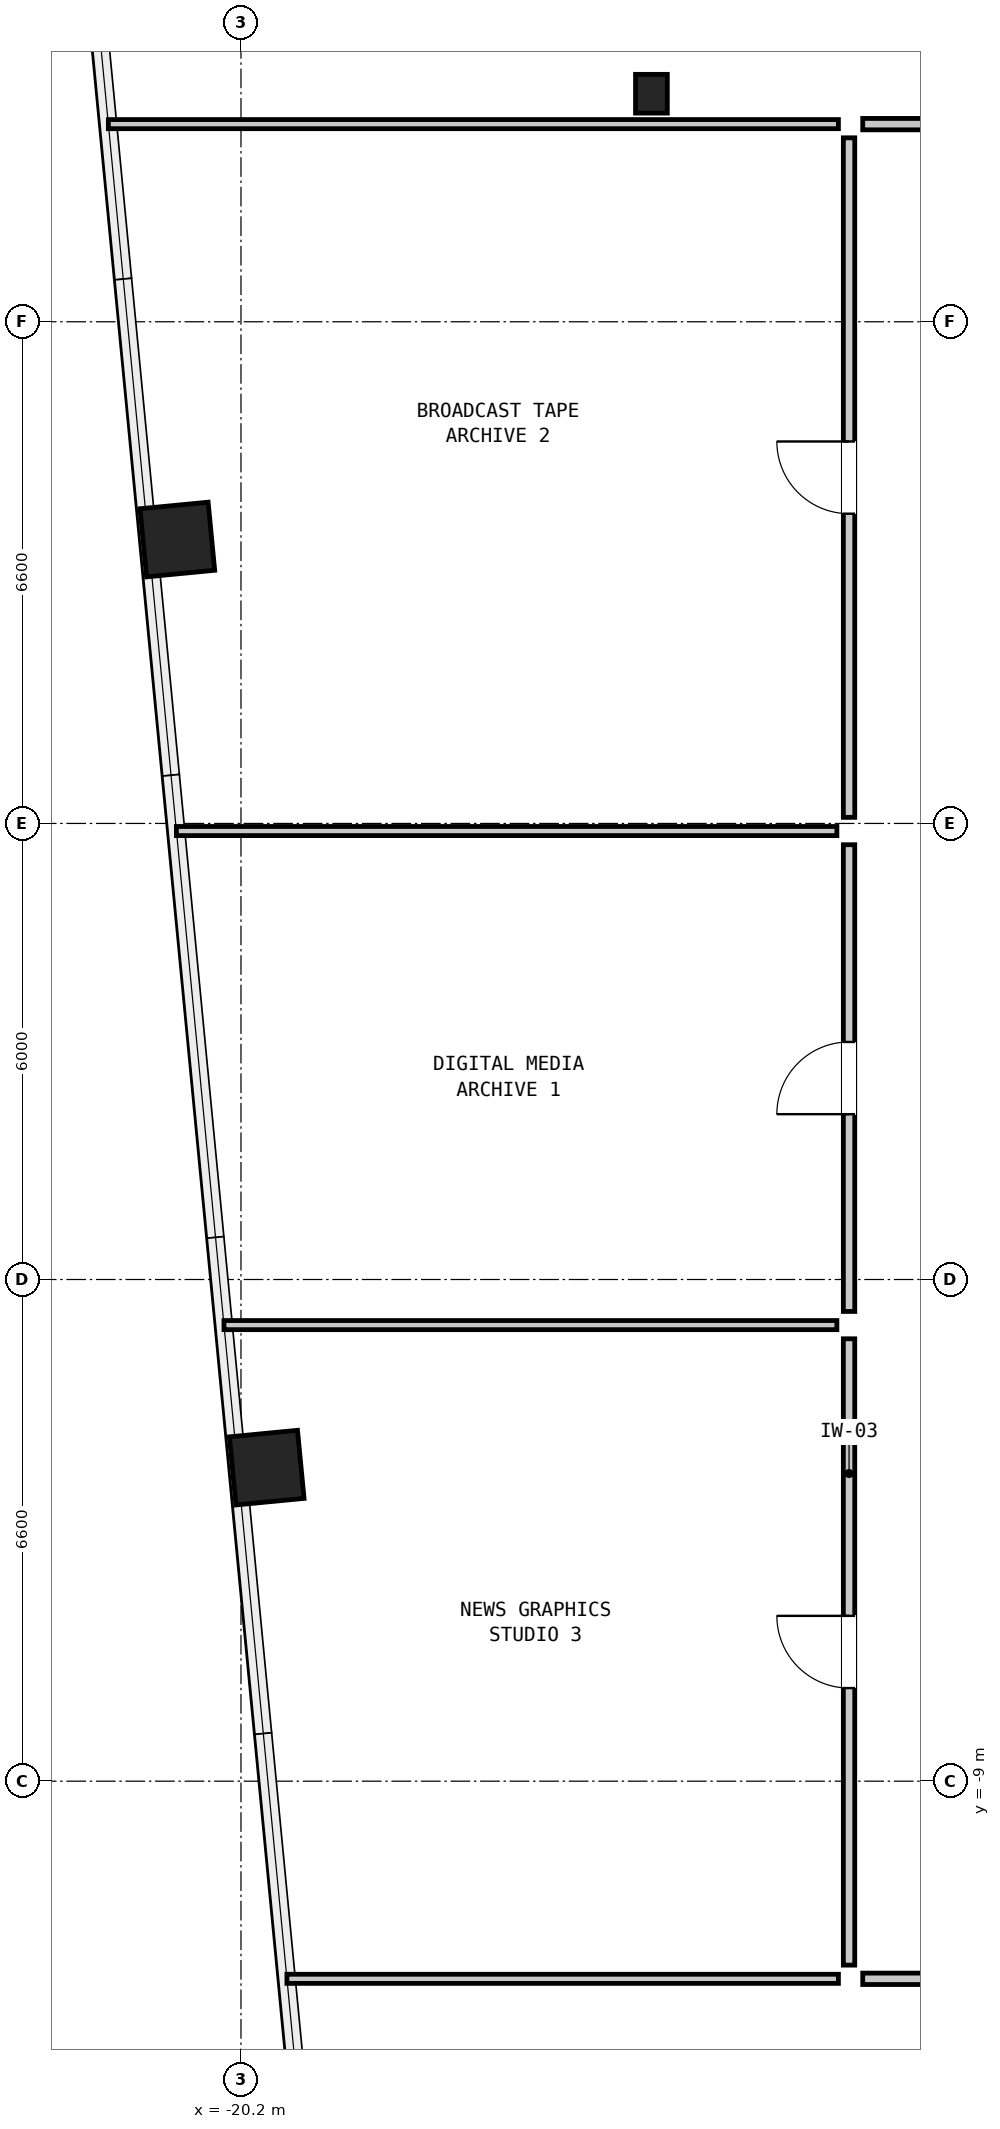
"""IFC4 building model, lengths in metres.
Left out: names, types, materials, properties, quantities, classifications, styles, units other than length and angle.
Written with IfcOpenShell. Run it as: python <this file> out.ifc"""

import sys

from ifc_helpers import new_model, si_unit, direction, frame, frame_2d, origin, origin_2d, place, context, subcontext, project, spatial, rectangle, hollow_rectangle, i_section, extrude, element, fill, save


model = new_model("IFC4")
c1 = context("Model", 3, precision=1e-05, world=origin(), true_north=direction((0.0, 1.0)))
c2 = subcontext(c1, "Body", "Model", "MODEL_VIEW")
j1 = project(units=[si_unit("LENGTHUNIT", "METRE"), si_unit("PLANEANGLEUNIT", "RADIAN")], contexts=[c1])
p1 = place(None, origin())
s1 = spatial("IfcSite", under=j1, at=p1, CompositionType="ELEMENT")
p2 = place(p1, origin())
s2 = spatial("IfcBuilding", under=s1, at=p2, CompositionType="ELEMENT")
p3 = place(p2, frame((0.0, 0.0, 90.8)))
s3 = spatial("IfcBuildingStorey", under=s2, at=p3, CompositionType="ELEMENT", Elevation=90.8)
for number, where, z_axis, x_axis in (
    (1, (-21.037, 7.335, 0.0), (0.0, 0.0, 1.0), (-0.096, 0.995, 0.0)),
    (2, (-19.861, -4.875, 0.0), (0.0, 0.0, 1.0), (-0.096, 0.995, 0.0)),
):
    element("IfcColumn", number, at=place(p3, frame(where, z_axis=z_axis, x_axis=x_axis)), inside=s3, PredefinedType="COLUMN", context=c2, shape_type="SweptSolid", body=[
        extrude(hollow_rectangle(XDim=0.9, YDim=0.9, WallThickness=0.055, at=origin_2d()), origin(), (0.0, 0.0, 1.0), 3.05),
    ])
p4 = place(p3, frame((-14.8, 13.2, 0.0), z_axis=(0.0, 0.0, 1.0), x_axis=(1.0, 0.0, 0.0)))
e3 = element("IfcColumn", 3, at=p4, inside=s3, PredefinedType="COLUMN", context=c2, shape_type="SweptSolid", body=[
    extrude(i_section(OverallWidth=0.418, OverallDepth=0.51, WebThickness=0.042, FlangeThickness=0.068, at=origin_2d()), origin(), (0.0, 0.0, 1.0), 3.05),
])
p5 = place(p3, frame((-21.945, 12.8, 0.0), z_axis=(0.0, 0.0, 1.0), x_axis=(1.0, 0.0, 0.0)))
e4 = element("IfcWall", 4, at=p5, inside=s3, PredefinedType="PARTITIONING", context=c2, shape_type="SweptSolid", body=[
    extrude(rectangle(XDim=9.605, YDim=0.12, at=frame_2d((4.802, 0.0))), origin(), (0.0, 0.0, 1.0), 2.83),
])
p6 = place(p3, frame((-19.595, -11.6, 0.0), z_axis=(0.0, 0.0, 1.0), x_axis=(1.0, 0.0, 0.0)))
e5 = element("IfcWall", 5, at=p6, inside=s3, PredefinedType="PARTITIONING", context=c2, shape_type="SweptSolid", body=[
    extrude(rectangle(XDim=7.255, YDim=0.12, at=frame_2d((3.628, 0.0))), origin(), (0.0, 0.0, 1.0), 2.274),
])
p7 = place(p3, frame((-20.424, -3.0, 0.0), z_axis=(0.0, 0.0, 1.0), x_axis=(1.0, 0.0, 0.0)))
e6 = element("IfcWall", 6, at=p7, inside=s3, PredefinedType="PARTITIONING", context=c2, shape_type="SweptSolid", body=[
    extrude(rectangle(XDim=8.063, YDim=0.12, at=frame_2d((4.032, 0.0))), origin(), (0.0, 0.0, 1.0), 1.799),
])
p8 = place(p3, frame((-21.049, 3.5, 0.0), z_axis=(0.0, 0.0, 1.0), x_axis=(1.0, 0.0, 0.0)))
e7 = element("IfcWall", 7, at=p8, inside=s3, PredefinedType="PARTITIONING", context=c2, shape_type="SweptSolid", body=[
    extrude(rectangle(XDim=8.689, YDim=0.12, at=frame_2d((4.345, 0.0))), origin(), (0.0, 0.0, 1.0), 1.799),
])
p9 = place(p3, frame((-12.02, 12.8, 0.0), z_axis=(0.0, 0.0, 1.0), x_axis=(1.0, 0.0, 0.0)))
e8 = element("IfcWall", 8, at=p9, inside=s3, PredefinedType="PARTITIONING", context=c2, shape_type="SweptSolid", body=[
    extrude(rectangle(XDim=5.34, YDim=0.15, at=frame_2d((2.67, 0.0))), origin(), (0.0, 0.0, 1.0), 2.83),
])
p10 = place(p9, frame((2.995, 0.0, 0.0)))
e9 = element("IfcOpeningElement", 9, at=p10, cuts=e8, PredefinedType="OPENING", context=c2, shape_type="SweptSolid", body=[
    extrude(rectangle(XDim=0.95, YDim=2.1, at=frame_2d((0.475, 1.05))), frame((0.0, 0.087, 0.0), z_axis=(0.0, -1.0, 0.0), x_axis=(1.0, 0.0, 0.0)), (0.0, 0.0, 1.0), 0.174),
])
p11 = place(p3, frame((-12.02, -11.6, 0.0), z_axis=(0.0, 0.0, 1.0), x_axis=(1.0, 0.0, 0.0)))
e10 = element("IfcWall", 10, at=p11, inside=s3, PredefinedType="PARTITIONING", context=c2, shape_type="SweptSolid", body=[
    extrude(rectangle(XDim=5.84, YDim=0.15, at=frame_2d((2.92, 0.0))), origin(), (0.0, 0.0, 1.0), 2.274),
])
p12 = place(p11, frame((3.045, 0.0, 0.0)))
e11 = element("IfcOpeningElement", 11, at=p12, cuts=e10, PredefinedType="OPENING", context=c2, shape_type="SweptSolid", body=[
    extrude(rectangle(XDim=0.95, YDim=2.1, at=frame_2d((0.475, 1.05))), frame((0.0, 0.087, 0.0), z_axis=(0.0, -1.0, 0.0), x_axis=(1.0, 0.0, 0.0)), (0.0, 0.0, 1.0), 0.174),
])
p13 = place(p3, frame((-12.2, -11.42, 0.0), z_axis=(0.0, 0.0, 1.0), x_axis=(0.0, 1.0, 0.0)))
e12 = element("IfcWall", 12, at=p13, inside=s3, PredefinedType="PARTITIONING", context=c2, shape_type="SweptSolid", body=[
    extrude(rectangle(XDim=8.24, YDim=0.15, at=frame_2d((4.12, 0.0))), origin(), (0.0, 0.0, 1.0), 2.83),
])
p14 = place(p13, frame((3.645, 0.0, 0.0)))
e13 = element("IfcOpeningElement", 13, at=p14, cuts=e12, PredefinedType="OPENING", context=c2, shape_type="SweptSolid", body=[
    extrude(rectangle(XDim=0.95, YDim=2.1, at=frame_2d((0.475, 1.05))), frame((0.0, 0.087, 0.0), z_axis=(0.0, -1.0, 0.0), x_axis=(1.0, 0.0, 0.0)), (0.0, 0.0, 1.0), 0.174),
])
p15 = place(p3, frame((-12.2, -2.82, 0.0), z_axis=(0.0, 0.0, 1.0), x_axis=(0.0, 1.0, 0.0)))
e14 = element("IfcWall", 14, at=p15, inside=s3, PredefinedType="PARTITIONING", context=c2, shape_type="SweptSolid", body=[
    extrude(rectangle(XDim=6.14, YDim=0.15, at=frame_2d((3.07, 0.0))), origin(), (0.0, 0.0, 1.0), 2.83),
])
p16 = place(p15, frame((2.595, 0.0, 0.0)))
e15 = element("IfcOpeningElement", 15, at=p16, cuts=e14, PredefinedType="OPENING", context=c2, shape_type="SweptSolid", body=[
    extrude(rectangle(XDim=0.95, YDim=2.1, at=frame_2d((0.475, 1.05))), frame((0.0, 0.087, 0.0), z_axis=(0.0, -1.0, 0.0), x_axis=(1.0, 0.0, 0.0)), (0.0, 0.0, 1.0), 0.174),
])
p17 = place(p3, frame((-12.2, 3.68, 0.0), z_axis=(0.0, 0.0, 1.0), x_axis=(0.0, 1.0, 0.0)))
e16 = element("IfcWall", 16, at=p17, inside=s3, PredefinedType="PARTITIONING", context=c2, shape_type="SweptSolid", body=[
    extrude(rectangle(XDim=8.94, YDim=0.15, at=frame_2d((4.47, 0.0))), origin(), (0.0, 0.0, 1.0), 2.83),
])
p18 = place(p17, frame((3.995, 0.0, 0.0)))
e17 = element("IfcOpeningElement", 17, at=p18, cuts=e16, PredefinedType="OPENING", context=c2, shape_type="SweptSolid", body=[
    extrude(rectangle(XDim=0.95, YDim=2.1, at=frame_2d((0.475, 1.05))), frame((0.0, 0.087, 0.0), z_axis=(0.0, -1.0, 0.0), x_axis=(1.0, 0.0, 0.0)), (0.0, 0.0, 1.0), 0.174),
])
p19 = place(p14, origin())
e18 = element("IfcDoor", 18, at=p19, inside=s3, OperationType="SINGLE_SWING_RIGHT", PredefinedType="DOOR", context=c2, shape_type="SweptSolid", body=[
    extrude(rectangle(XDim=0.95, YDim=2.1, at=frame_2d((0.475, 1.05))), frame((0.0, 0.025, 0.0), z_axis=(0.0, -1.0, 0.0), x_axis=(1.0, 0.0, 0.0)), (0.0, 0.0, 1.0), 0.05),
])
fill(e13, e18)
p20 = place(p16, origin())
e19 = element("IfcDoor", 19, at=p20, inside=s3, OperationType="SINGLE_SWING_LEFT", PredefinedType="DOOR", context=c2, shape_type="SweptSolid", body=[
    extrude(rectangle(XDim=0.95, YDim=2.1, at=frame_2d((0.475, 1.05))), frame((0.0, 0.025, 0.0), z_axis=(0.0, -1.0, 0.0), x_axis=(1.0, 0.0, 0.0)), (0.0, 0.0, 1.0), 0.05),
])
fill(e15, e19)
p21 = place(p18, origin())
e20 = element("IfcDoor", 20, at=p21, inside=s3, OperationType="SINGLE_SWING_RIGHT", PredefinedType="DOOR", context=c2, shape_type="SweptSolid", body=[
    extrude(rectangle(XDim=0.95, YDim=2.1, at=frame_2d((0.475, 1.05))), frame((0.0, 0.025, 0.0), z_axis=(0.0, -1.0, 0.0), x_axis=(1.0, 0.0, 0.0)), (0.0, 0.0, 1.0), 0.05),
])
fill(e17, e20)
save(model, sys.argv[1])
